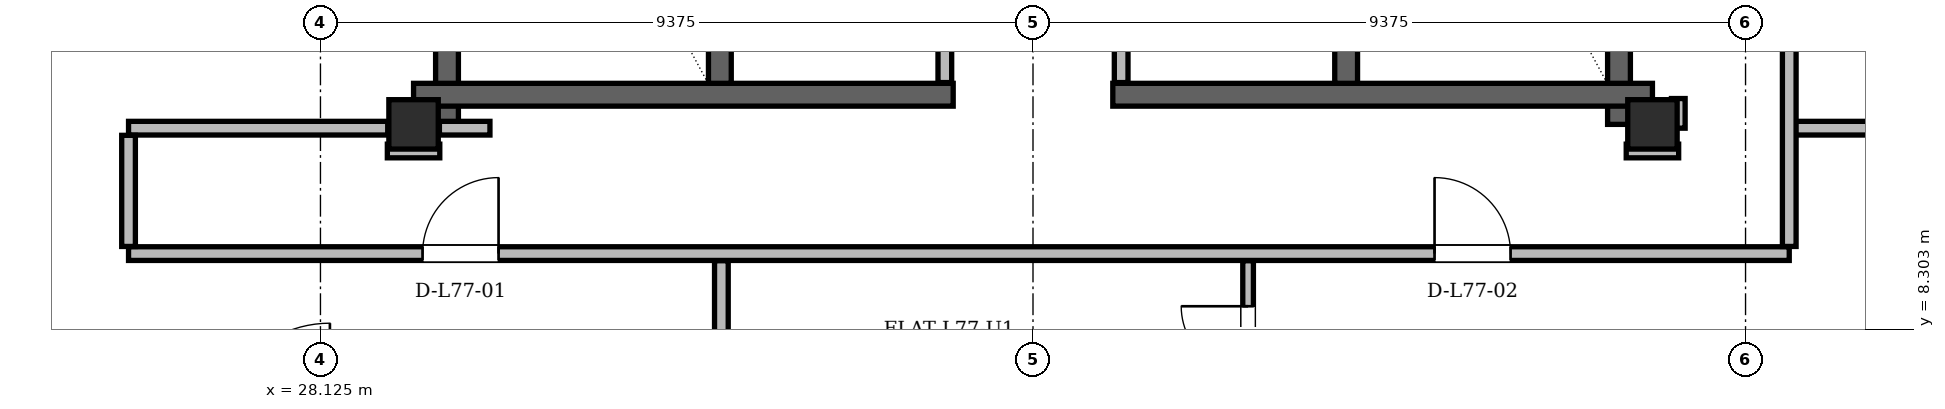
"""IFC4 building model, lengths in metres.
Left out: names, types, materials, properties, quantities, classifications, styles, units other than length and angle.
Written with IfcOpenShell. Run it as: python <this file> out.ifc"""

import sys

from ifc_helpers import new_model, si_unit, direction, frame, frame_2d, origin, origin_2d, place, context, subcontext, project, spatial, rectangle, hollow_rectangle, extrude, element, fill, save


model = new_model("IFC4")
c1 = context("Model", 3, precision=1e-05, world=origin(), true_north=direction((0.0, 1.0)))
c2 = subcontext(c1, "Body", "Model", "MODEL_VIEW")
j1 = project(units=[si_unit("LENGTHUNIT", "METRE"), si_unit("PLANEANGLEUNIT", "RADIAN")], contexts=[c1])
p1 = place(None, origin())
s1 = spatial("IfcSite", under=j1, at=p1, CompositionType="ELEMENT")
p2 = place(p1, origin())
s2 = spatial("IfcBuilding", under=s1, at=p2, CompositionType="ELEMENT")
p3 = place(p2, frame((0.0, 0.0, 292.8)))
s3 = spatial("IfcBuildingStorey", under=s2, at=p3, CompositionType="ELEMENT", Elevation=292.8)
for number, where, z_axis, x_axis in (
    (1, (29.35, 11.0, 0.0), (0.0, 0.0, 1.0), (1.0, 0.0, 0.0)),
    (2, (45.65, 11.0, 0.0), (0.0, 0.0, 1.0), (1.0, 0.0, 0.0)),
):
    element("IfcColumn", number, at=place(p3, frame(where, z_axis=z_axis, x_axis=x_axis)), inside=s3, PredefinedType="COLUMN", context=c2, shape_type="SweptSolid", body=[
        extrude(hollow_rectangle(XDim=0.65, YDim=0.65, WallThickness=0.05, at=origin_2d()), origin(), (0.0, 0.0, 1.0), 3.9),
    ])
for number, where, z_axis, x_axis in (
    (3, (29.79, 11.0, 0.0), (0.0, 0.0, 1.0), (0.0, 1.0, 0.0)),
    (4, (45.21, 11.0, 0.0), (0.0, 0.0, 1.0), (0.0, 1.0, 0.0)),
):
    element("IfcWall", number, at=place(p3, frame(where, z_axis=z_axis, x_axis=x_axis)), inside=s3, PredefinedType="SHEAR", context=c2, shape_type="SweptSolid", body=[
        extrude(rectangle(XDim=13.3, YDim=0.3, at=frame_2d((6.65, 0.0))), origin(), (0.0, 0.0, 1.0), 3.68),
    ])
for number, where, z_axis, x_axis in (
    (5, (29.35, 11.39, 0.0), (0.0, 0.0, 1.0), (1.0, 0.0, 0.0)),
    (6, (38.55, 11.39, 0.0), (0.0, 0.0, 1.0), (1.0, 0.0, 0.0)),
):
    element("IfcWall", number, at=place(p3, frame(where, z_axis=z_axis, x_axis=x_axis)), inside=s3, PredefinedType="SHEAR", context=c2, shape_type="SweptSolid", body=[
        extrude(rectangle(XDim=7.1, YDim=0.3, at=frame_2d((3.55, 0.0))), origin(), (0.0, 0.0, 1.0), 3.68),
    ])
for number, where, z_axis, x_axis in (
    (7, (33.38, 11.54, 0.0), (0.0, 0.0, 1.0), (0.0, 1.0, 0.0)),
    (8, (41.62, 11.54, 0.0), (0.0, 0.0, 1.0), (0.0, 1.0, 0.0)),
):
    element("IfcWall", number, at=place(p3, frame(where, z_axis=z_axis, x_axis=x_axis)), inside=s3, PredefinedType="SHEAR", context=c2, shape_type="SweptSolid", body=[
        extrude(rectangle(XDim=7.62, YDim=0.3, at=frame_2d((3.81, 0.0))), origin(), (0.0, 0.0, 1.0), 3.68),
    ])
p4 = place(p3, frame((58.337, 10.439, 0.0), z_axis=(0.0, 0.0, 1.0), x_axis=(-0.499999767403, 0.866025538074, 0.0)))
e9 = element("IfcWall", 9, at=p4, inside=s3, PredefinedType="SOLIDWALL", context=c2, shape_type="SweptSolid", body=[
    extrude(rectangle(XDim=37.57, YDim=0.29, at=frame_2d((18.785, 0.0))), origin(), (0.0, 0.0, 1.0), 3.058),
])
p5 = place(p4, frame((8.034, 0.0, 0.0)))
e10 = element("IfcOpeningElement", 10, at=p5, cuts=e9, PredefinedType="OPENING", context=c2, shape_type="SweptSolid", body=[
    extrude(rectangle(XDim=1.5, YDim=2.2, at=frame_2d((0.75, 1.1))), frame((0.0, 0.145, 0.0), z_axis=(0.0, -1.0, 0.0), x_axis=(1.0, 0.0, 0.0)), (0.0, 0.0, 1.0), 0.29),
])
p6 = place(p4, frame((32.531, 0.0, 0.0)))
e11 = element("IfcOpeningElement", 11, at=p6, cuts=e9, PredefinedType="OPENING", context=c2, shape_type="SweptSolid", body=[
    extrude(rectangle(XDim=1.3, YDim=2.2, at=frame_2d((0.65, 1.1))), frame((0.0, 0.145, 0.0), z_axis=(0.0, -1.0, 0.0), x_axis=(1.0, 0.0, 0.0)), (0.0, 0.0, 1.0), 0.29),
])
p7 = place(p4, frame((0.916, 0.0, 0.85)))
e12 = element("IfcOpeningElement", 12, at=p7, cuts=e9, PredefinedType="OPENING", context=c2, shape_type="SweptSolid", body=[
    extrude(rectangle(XDim=1.2, YDim=1.48, at=frame_2d((0.6, 0.74))), frame((0.0, 0.145, 0.0), z_axis=(0.0, -1.0, 0.0), x_axis=(1.0, 0.0, 0.0)), (0.0, 0.0, 1.0), 0.29),
])
p8 = place(p4, frame((13.243, 0.0, 0.85)))
e13 = element("IfcOpeningElement", 13, at=p8, cuts=e9, PredefinedType="OPENING", context=c2, shape_type="SweptSolid", body=[
    extrude(rectangle(XDim=1.6, YDim=1.7, at=frame_2d((0.8, 0.85))), frame((0.0, 0.145, 0.0), z_axis=(0.0, -1.0, 0.0), x_axis=(1.0, 0.0, 0.0)), (0.0, 0.0, 1.0), 0.29),
])
p9 = place(p4, frame((2.444, 0.0, 0.85)))
e14 = element("IfcOpeningElement", 14, at=p9, cuts=e9, PredefinedType="OPENING", context=c2, shape_type="SweptSolid", body=[
    extrude(rectangle(XDim=1.2, YDim=1.48, at=frame_2d((0.6, 0.74))), frame((0.0, 0.145, 0.0), z_axis=(0.0, -1.0, 0.0), x_axis=(1.0, 0.0, 0.0)), (0.0, 0.0, 1.0), 0.29),
])
p10 = place(p4, frame((35.19, 0.0, 0.85)))
e15 = element("IfcOpeningElement", 15, at=p10, cuts=e9, PredefinedType="OPENING", context=c2, shape_type="SweptSolid", body=[
    extrude(rectangle(XDim=1.2, YDim=1.48, at=frame_2d((0.6, 0.74))), frame((0.0, 0.145, 0.0), z_axis=(0.0, -1.0, 0.0), x_axis=(1.0, 0.0, 0.0)), (0.0, 0.0, 1.0), 0.29),
])
p11 = place(p4, frame((17.528, 0.0, 0.85)))
e16 = element("IfcOpeningElement", 16, at=p11, cuts=e9, PredefinedType="OPENING", context=c2, shape_type="SweptSolid", body=[
    extrude(rectangle(XDim=2.5, YDim=2.098, at=frame_2d((1.25, 1.049))), frame((0.0, 0.145, 0.0), z_axis=(0.0, -1.0, 0.0), x_axis=(1.0, 0.0, 0.0)), (0.0, 0.0, 1.0), 0.29),
])
p12 = place(p4, frame((27.565, 0.0, 0.85)))
e17 = element("IfcOpeningElement", 17, at=p12, cuts=e9, PredefinedType="OPENING", context=c2, shape_type="SweptSolid", body=[
    extrude(rectangle(XDim=1.2, YDim=1.48, at=frame_2d((0.6, 0.74))), frame((0.0, 0.145, 0.0), z_axis=(0.0, -1.0, 0.0), x_axis=(1.0, 0.0, 0.0)), (0.0, 0.0, 1.0), 0.29),
])
p13 = place(p3, frame((35.448, 42.976, 0.0), z_axis=(0.0, 0.0, 1.0), x_axis=(-0.499999767403, -0.866025538074, 0.0)))
e18 = element("IfcWall", 18, at=p13, inside=s3, PredefinedType="SOLIDWALL", context=c2, shape_type="SweptSolid", body=[
    extrude(rectangle(XDim=37.57, YDim=0.29, at=frame_2d((18.785, 0.0))), origin(), (0.0, 0.0, 1.0), 3.058),
])
p14 = place(p13, frame((8.034, 0.0, 0.0)))
e19 = element("IfcOpeningElement", 19, at=p14, cuts=e18, PredefinedType="OPENING", context=c2, shape_type="SweptSolid", body=[
    extrude(rectangle(XDim=1.5, YDim=2.2, at=frame_2d((0.75, 1.1))), frame((0.0, 0.145, 0.0), z_axis=(0.0, -1.0, 0.0), x_axis=(1.0, 0.0, 0.0)), (0.0, 0.0, 1.0), 0.29),
])
p15 = place(p13, frame((32.431, 0.0, 0.0)))
e20 = element("IfcOpeningElement", 20, at=p15, cuts=e18, PredefinedType="OPENING", context=c2, shape_type="SweptSolid", body=[
    extrude(rectangle(XDim=1.5, YDim=2.2, at=frame_2d((0.75, 1.1))), frame((0.0, 0.145, 0.0), z_axis=(0.0, -1.0, 0.0), x_axis=(1.0, 0.0, 0.0)), (0.0, 0.0, 1.0), 0.29),
])
p16 = place(p13, frame((27.302, 0.0, 0.85)))
e21 = element("IfcOpeningElement", 21, at=p16, cuts=e18, PredefinedType="OPENING", context=c2, shape_type="SweptSolid", body=[
    extrude(rectangle(XDim=2.2, YDim=1.85, at=frame_2d((1.1, 0.925))), frame((0.0, 0.145, 0.0), z_axis=(0.0, -1.0, 0.0), x_axis=(1.0, 0.0, 0.0)), (0.0, 0.0, 1.0), 0.29),
])
p17 = place(p13, frame((34.367, 0.0, 0.85)))
e22 = element("IfcOpeningElement", 22, at=p17, cuts=e18, PredefinedType="OPENING", context=c2, shape_type="SweptSolid", body=[
    extrude(rectangle(XDim=1.6, YDim=1.7, at=frame_2d((0.8, 0.85))), frame((0.0, 0.145, 0.0), z_axis=(0.0, -1.0, 0.0), x_axis=(1.0, 0.0, 0.0)), (0.0, 0.0, 1.0), 0.29),
])
p18 = place(p13, frame((21.688, 0.0, 0.85)))
e23 = element("IfcOpeningElement", 23, at=p18, cuts=e18, PredefinedType="OPENING", context=c2, shape_type="SweptSolid", body=[
    extrude(rectangle(XDim=1.2, YDim=1.48, at=frame_2d((0.6, 0.74))), frame((0.0, 0.145, 0.0), z_axis=(0.0, -1.0, 0.0), x_axis=(1.0, 0.0, 0.0)), (0.0, 0.0, 1.0), 0.29),
])
p19 = place(p13, frame((23.938, 0.0, 0.85)))
e24 = element("IfcOpeningElement", 24, at=p19, cuts=e18, PredefinedType="OPENING", context=c2, shape_type="SweptSolid", body=[
    extrude(rectangle(XDim=1.4, YDim=1.6, at=frame_2d((0.7, 0.8))), frame((0.0, 0.145, 0.0), z_axis=(0.0, -1.0, 0.0), x_axis=(1.0, 0.0, 0.0)), (0.0, 0.0, 1.0), 0.29),
])
p20 = place(p13, frame((15.363, 0.0, 0.85)))
e25 = element("IfcOpeningElement", 25, at=p20, cuts=e18, PredefinedType="OPENING", context=c2, shape_type="SweptSolid", body=[
    extrude(rectangle(XDim=2.4, YDim=1.9, at=frame_2d((1.2, 0.95))), frame((0.0, 0.145, 0.0), z_axis=(0.0, -1.0, 0.0), x_axis=(1.0, 0.0, 0.0)), (0.0, 0.0, 1.0), 0.29),
])
p21 = place(p13, frame((1.165, 0.0, 0.85)))
e26 = element("IfcOpeningElement", 26, at=p21, cuts=e18, PredefinedType="OPENING", context=c2, shape_type="SweptSolid", body=[
    extrude(rectangle(XDim=1.2, YDim=1.48, at=frame_2d((0.6, 0.74))), frame((0.0, 0.145, 0.0), z_axis=(0.0, -1.0, 0.0), x_axis=(1.0, 0.0, 0.0)), (0.0, 0.0, 1.0), 0.29),
])
p22 = place(p3, frame((36.34, 11.55, 0.0), z_axis=(0.0, 0.0, 1.0), x_axis=(0.0, 1.0, 0.0)))
e27 = element("IfcWall", 27, at=p22, inside=s3, PredefinedType="PARTITIONING", context=c2, shape_type="SweptSolid", body=[
    extrude(rectangle(XDim=5.55, YDim=0.18, at=frame_2d((2.775, 0.0))), origin(), (0.0, 0.0, 1.0), 3.68),
])
p23 = place(p22, frame((0.55, 0.0, 0.0)))
e28 = element("IfcOpeningElement", 28, at=p23, cuts=e27, PredefinedType="OPENING", context=c2, shape_type="SweptSolid", body=[
    extrude(rectangle(XDim=0.88, YDim=2.08, at=frame_2d((0.44, 1.04))), frame((0.0, 0.09, 0.0), z_axis=(0.0, -1.0, 0.0), x_axis=(1.0, 0.0, 0.0)), (0.0, 0.0, 1.0), 0.18),
])
p24 = place(p22, frame((3.25, 0.0, 0.0)))
e29 = element("IfcOpeningElement", 29, at=p24, cuts=e27, PredefinedType="OPENING", context=c2, shape_type="SweptSolid", body=[
    extrude(rectangle(XDim=0.88, YDim=2.08, at=frame_2d((0.44, 1.04))), frame((0.0, 0.09, 0.0), z_axis=(0.0, -1.0, 0.0), x_axis=(1.0, 0.0, 0.0)), (0.0, 0.0, 1.0), 0.18),
])
p25 = place(p3, frame((38.66, 11.55, 0.0), z_axis=(0.0, 0.0, 1.0), x_axis=(0.0, 1.0, 0.0)))
e30 = element("IfcWall", 30, at=p25, inside=s3, PredefinedType="PARTITIONING", context=c2, shape_type="SweptSolid", body=[
    extrude(rectangle(XDim=5.55, YDim=0.18, at=frame_2d((2.775, 0.0))), origin(), (0.0, 0.0, 1.0), 3.68),
])
p26 = place(p25, frame((1.35, 0.0, 0.0)))
e31 = element("IfcOpeningElement", 31, at=p26, cuts=e30, PredefinedType="OPENING", context=c2, shape_type="SweptSolid", body=[
    extrude(rectangle(XDim=0.88, YDim=2.08, at=frame_2d((0.44, 1.04))), frame((0.0, 0.09, 0.0), z_axis=(0.0, -1.0, 0.0), x_axis=(1.0, 0.0, 0.0)), (0.0, 0.0, 1.0), 0.18),
])
p27 = place(p25, frame((4.1, 0.0, 0.0)))
e32 = element("IfcOpeningElement", 32, at=p27, cuts=e30, PredefinedType="OPENING", context=c2, shape_type="SweptSolid", body=[
    extrude(rectangle(XDim=0.88, YDim=2.08, at=frame_2d((0.44, 1.04))), frame((0.0, 0.09, 0.0), z_axis=(0.0, -1.0, 0.0), x_axis=(1.0, 0.0, 0.0)), (0.0, 0.0, 1.0), 0.18),
])
p28 = place(p3, frame((25.6, 9.3, 0.0), z_axis=(0.0, 0.0, 1.0), x_axis=(1.0, 0.0, 0.0)))
e33 = element("IfcWall", 33, at=p28, inside=s3, PredefinedType="PARTITIONING", context=c2, shape_type="SweptSolid", body=[
    extrude(rectangle(XDim=21.85, YDim=0.18, at=frame_2d((10.925, 0.0))), origin(), (0.0, 0.0, 1.0), 3.68),
])
p29 = place(p28, frame((3.868, 0.0, 0.0)))
e34 = element("IfcOpeningElement", 34, at=p29, cuts=e33, PredefinedType="OPENING", context=c2, shape_type="SweptSolid", body=[
    extrude(rectangle(XDim=1.0, YDim=2.18, at=frame_2d((0.5, 1.09))), frame((0.0, 0.09, 0.0), z_axis=(0.0, -1.0, 0.0), x_axis=(1.0, 0.0, 0.0)), (0.0, 0.0, 1.0), 0.18),
])
p30 = place(p28, frame((17.183, 0.0, 0.0)))
e35 = element("IfcOpeningElement", 35, at=p30, cuts=e33, PredefinedType="OPENING", context=c2, shape_type="SweptSolid", body=[
    extrude(rectangle(XDim=1.0, YDim=2.18, at=frame_2d((0.5, 1.09))), frame((0.0, 0.09, 0.0), z_axis=(0.0, -1.0, 0.0), x_axis=(1.0, 0.0, 0.0)), (0.0, 0.0, 1.0), 0.18),
])
for number, where, z_axis, x_axis in (
    (36, (29.005, 10.65, 0.0), (0.0, 0.0, 1.0), (1.0, 0.0, 0.0)),
    (37, (45.305, 10.65, 0.0), (0.0, 0.0, 1.0), (1.0, 0.0, 0.0)),
):
    element("IfcWall", number, at=place(p3, frame(where, z_axis=z_axis, x_axis=x_axis)), inside=s3, PredefinedType="PARTITIONING", context=c2, shape_type="SweptSolid", body=[
        extrude(rectangle(XDim=0.69, YDim=0.18, at=frame_2d((0.345, 0.0))), origin(), (0.0, 0.0, 1.0), 3.68),
    ])
p31 = place(p3, frame((25.6, 10.95, 0.0), z_axis=(0.0, 0.0, 1.0), x_axis=(1.0, 0.0, 0.0)))
e38 = element("IfcWall", 38, at=p31, inside=s3, PredefinedType="PARTITIONING", context=c2, shape_type="SweptSolid", body=[
    extrude(rectangle(XDim=3.41, YDim=0.18, at=frame_2d((1.705, 0.0))), origin(), (0.0, 0.0, 1.0), 3.266),
])
p32 = place(p3, frame((29.69, 10.95, 0.0), z_axis=(0.0, 0.0, 1.0), x_axis=(1.0, 0.0, 0.0)))
e39 = element("IfcWall", 39, at=p32, inside=s3, PredefinedType="PARTITIONING", context=c2, shape_type="SweptSolid", body=[
    extrude(rectangle(XDim=0.665, YDim=0.18, at=frame_2d((0.333, 0.0))), origin(), (0.0, 0.0, 1.0), 2.82),
])
p33 = place(p3, frame((47.45, 10.95, 0.0), z_axis=(0.0, 0.0, 1.0), x_axis=(1.0, 0.0, 0.0)))
e40 = element("IfcWall", 40, at=p33, inside=s3, PredefinedType="PARTITIONING", context=c2, shape_type="SweptSolid", body=[
    extrude(rectangle(XDim=10.421, YDim=0.18, at=frame_2d((5.21, 0.0))), origin(), (0.0, 0.0, 1.0), 3.266),
])
p34 = place(p3, frame((25.6, 9.394, 0.0), z_axis=(0.0, 0.0, 1.0), x_axis=(0.0, 1.0, 0.0)))
e41 = element("IfcWall", 41, at=p34, inside=s3, PredefinedType="PARTITIONING", context=c2, shape_type="SweptSolid", body=[
    extrude(rectangle(XDim=1.462, YDim=0.18, at=frame_2d((0.731, 0.0))), origin(), (0.0, 0.0, 1.0), 3.266),
])
p35 = place(p3, frame((33.4, 7.034, 0.0), z_axis=(0.0, 0.0, 1.0), x_axis=(0.0, 1.0, 0.0)))
e42 = element("IfcWall", 42, at=p35, inside=s3, PredefinedType="PARTITIONING", context=c2, shape_type="SweptSolid", body=[
    extrude(rectangle(XDim=2.172, YDim=0.18, at=frame_2d((1.086, 0.0))), origin(), (0.0, 0.0, 1.0), 3.68),
])
p36 = place(p3, frame((40.33, 7.034, 0.0), z_axis=(0.0, 0.0, 1.0), x_axis=(0.0, 1.0, 0.0)))
e43 = element("IfcWall", 43, at=p36, inside=s3, PredefinedType="PARTITIONING", context=c2, shape_type="SweptSolid", body=[
    extrude(rectangle(XDim=2.172, YDim=0.14, at=frame_2d((1.086, 0.0))), origin(), (0.0, 0.0, 1.0), 3.68),
])
p37 = place(p36, frame((0.694, 0.0, 0.0)))
e44 = element("IfcOpeningElement", 44, at=p37, cuts=e43, PredefinedType="OPENING", context=c2, shape_type="SweptSolid", body=[
    extrude(rectangle(XDim=0.88, YDim=2.08, at=frame_2d((0.44, 1.04))), frame((0.0, 0.07, 0.0), z_axis=(0.0, -1.0, 0.0), x_axis=(1.0, 0.0, 0.0)), (0.0, 0.0, 1.0), 0.14),
])
p38 = place(p3, frame((45.99, 10.95, 0.0), z_axis=(0.0, 0.0, 1.0), x_axis=(0.0, 1.0, 0.0)))
e45 = element("IfcWall", 45, at=p38, inside=s3, PredefinedType="PARTITIONING", context=c2, shape_type="SweptSolid", body=[
    extrude(rectangle(XDim=0.39, YDim=0.18, at=frame_2d((0.195, 0.0))), origin(), (0.0, 0.0, 1.0), 3.68),
])
p39 = place(p3, frame((47.45, 9.394, 0.0), z_axis=(0.0, 0.0, 1.0), x_axis=(0.0, 1.0, 0.0)))
e46 = element("IfcWall", 46, at=p39, inside=s3, PredefinedType="PARTITIONING", context=c2, shape_type="SweptSolid", body=[
    extrude(rectangle(XDim=16.482, YDim=0.18, at=frame_2d((8.241, 0.0))), origin(), (0.0, 0.0, 1.0), 3.266),
])
p40 = place(p39, frame((9.343, 0.0, 0.0)))
e47 = element("IfcOpeningElement", 47, at=p40, cuts=e46, PredefinedType="OPENING", context=c2, shape_type="SweptSolid", body=[
    extrude(rectangle(XDim=1.0, YDim=2.18, at=frame_2d((0.5, 1.09))), frame((0.0, 0.09, 0.0), z_axis=(0.0, -1.0, 0.0), x_axis=(1.0, 0.0, 0.0)), (0.0, 0.0, 1.0), 0.18),
])
p41 = place(p29, origin())
e48 = element("IfcDoor", 48, at=p41, inside=s3, OperationType="SINGLE_SWING_RIGHT", PredefinedType="DOOR", context=c2, shape_type="SweptSolid", body=[
    extrude(rectangle(XDim=1.0, YDim=2.18, at=frame_2d((0.5, 1.09))), frame((0.0, 0.025, 0.0), z_axis=(0.0, -1.0, 0.0), x_axis=(1.0, 0.0, 0.0)), (0.0, 0.0, 1.0), 0.05),
])
fill(e34, e48)
p42 = place(p30, origin())
e49 = element("IfcDoor", 49, at=p42, inside=s3, OperationType="SINGLE_SWING_LEFT", PredefinedType="DOOR", context=c2, shape_type="SweptSolid", body=[
    extrude(rectangle(XDim=1.0, YDim=2.18, at=frame_2d((0.5, 1.09))), frame((0.0, 0.025, 0.0), z_axis=(0.0, -1.0, 0.0), x_axis=(1.0, 0.0, 0.0)), (0.0, 0.0, 1.0), 0.05),
])
fill(e35, e49)
p43 = place(p37, origin())
e50 = element("IfcDoor", 50, at=p43, inside=s3, OperationType="SINGLE_SWING_RIGHT", PredefinedType="DOOR", context=c2, shape_type="SweptSolid", body=[
    extrude(rectangle(XDim=0.88, YDim=2.08, at=frame_2d((0.44, 1.04))), frame((0.0, 0.025, 0.0), z_axis=(0.0, -1.0, 0.0), x_axis=(1.0, 0.0, 0.0)), (0.0, 0.0, 1.0), 0.05),
])
fill(e44, e50)
save(model, sys.argv[1])
